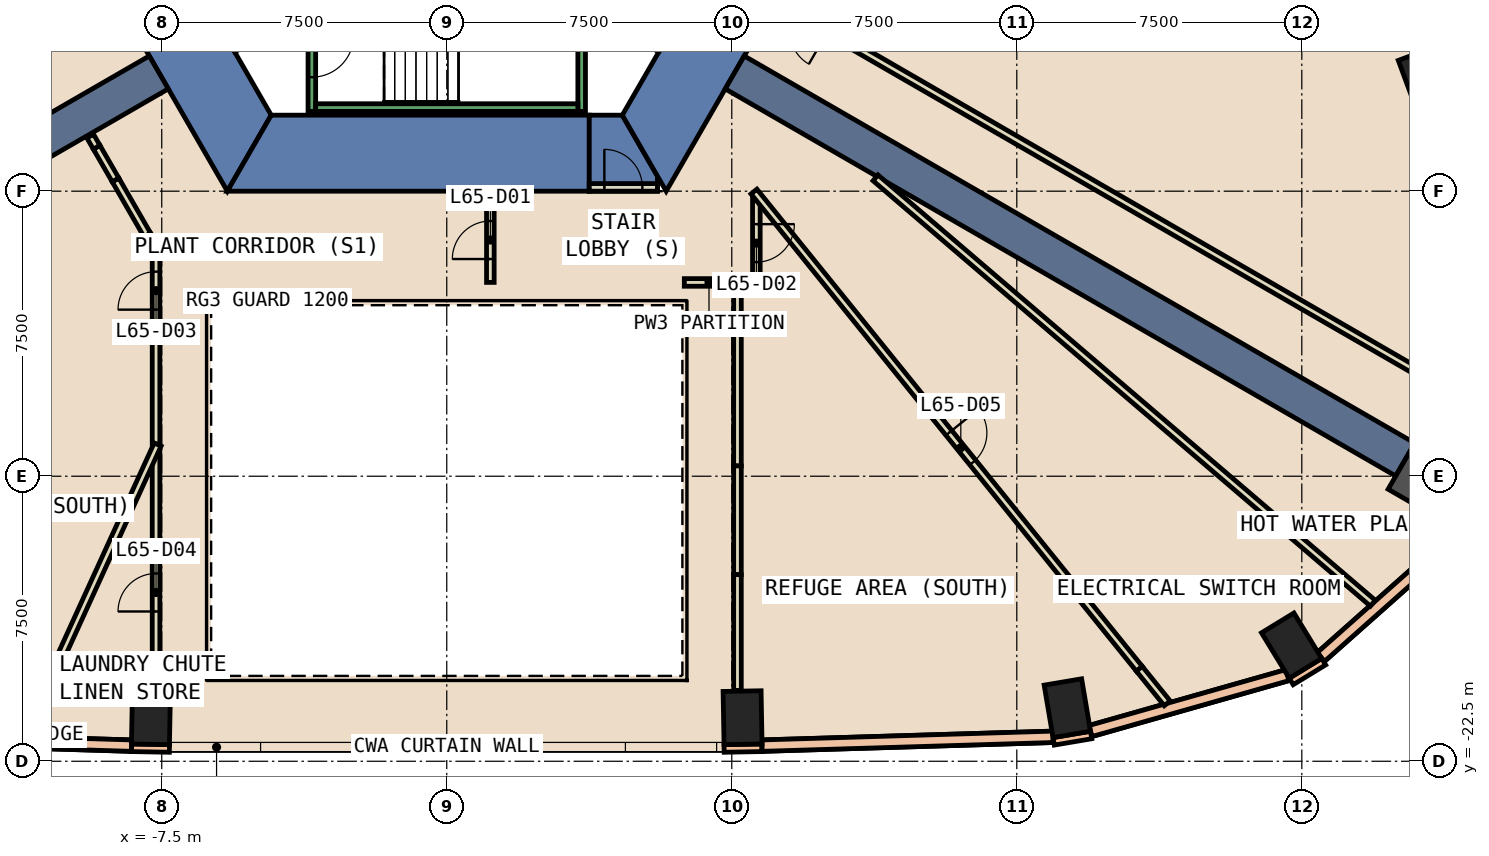
"""IFC4 building model, lengths in metres.
Left out: names, types, materials, properties, quantities, classifications, styles, units other than length and angle.
Written with IfcOpenShell. Run it as: python <this file> out.ifc"""

import sys

from ifc_helpers import new_model, si_unit, direction, frame, frame_2d, origin, origin_2d, place, context, subcontext, project, spatial, polyline, rectangle, outline, extrude, element, fill, save


model = new_model("IFC4")
c1 = context("Model", 3, precision=1e-05, world=origin(), true_north=direction((0.0, 1.0)))
c2 = subcontext(c1, "Body", "Model", "MODEL_VIEW")
j1 = project(units=[si_unit("LENGTHUNIT", "METRE"), si_unit("PLANEANGLEUNIT", "RADIAN")], contexts=[c1])
p1 = place(None, origin())
s1 = spatial("IfcSite", under=j1, at=p1, CompositionType="ELEMENT")
p2 = place(p1, origin())
s2 = spatial("IfcBuilding", under=s1, at=p2, CompositionType="ELEMENT")
p3 = place(p2, frame((0.0, 0.0, 281.0)))
s3 = spatial("IfcBuildingStorey", under=s2, at=p3, CompositionType="ELEMENT", Elevation=281.0)
for number, where, z_axis, x_axis in (
    (1, (-7.784, -21.354, -0.6), (0.0, 0.0, 1.0), (-1.0, 0.018, 0.0)),
    (2, (7.784, -21.354, -0.6), (0.0, 0.0, 1.0), (1.0, 0.018, 0.0)),
    (3, (16.33, -21.104, -0.6), (0.0, 0.0, 1.0), (0.986, 0.167, 0.0)),
    (4, (22.231, -19.457, -0.6), (0.0, 0.0, 1.0), (0.853, 0.521, 0.0)),
):
    element("IfcColumn", number, at=place(p3, frame(where, z_axis=z_axis, x_axis=x_axis)), inside=s3, PredefinedType="COLUMN", context=c2, shape_type="SweptSolid", body=[
        extrude(rectangle(XDim=1.0, YDim=1.4, at=origin_2d()), origin(), (0.0, 0.0, 1.0), 5.4),
    ])
p4 = place(p3, frame((26.001, -15.012, -0.6), z_axis=(0.0, 0.0, 1.0), x_axis=(-0.866025403784, 0.5, 0.0)))
e5 = element("IfcColumn", 5, at=p4, inside=s3, PredefinedType="COLUMN", context=c2, shape_type="SweptSolid", body=[
    extrude(rectangle(XDim=1.8, YDim=1.8, at=origin_2d()), origin(), (0.0, 0.0, 1.0), 5.4),
])
p5 = place(p3, frame((25.869, -4.285, -0.6), z_axis=(0.0, 0.0, 1.0), x_axis=(-0.346853804003, 0.937919206888, 0.0)))
e6 = element("IfcColumn", 6, at=p5, inside=s3, PredefinedType="COLUMN", context=c2, shape_type="SweptSolid", body=[
    extrude(rectangle(XDim=1.0, YDim=1.4, at=origin_2d()), origin(), (0.0, 0.0, 1.0), 5.4),
])
p6 = place(p3, frame((0.0, 0.0, -0.6)))
e7 = element("IfcWall", 7, at=p6, inside=s3, PredefinedType="SHEAR", context=c2, shape_type="SweptSolid", body=[
    extrude(outline(polyline([(-11.547, 2.5), (-5.774, -7.5), (-4.619, -5.5), (-9.238, 2.5), (-11.547, 2.5)])), origin(), (0.0, 0.0, 1.0), 5.4),
])
p7 = place(p3, frame((0.0, 0.0, -0.6)))
e8 = element("IfcWall", 8, at=p7, inside=s3, PredefinedType="SHEAR", context=c2, shape_type="SweptSolid", body=[
    extrude(outline(polyline([(3.75, -7.5), (3.75, -5.5), (-4.619, -5.5), (-5.774, -7.5), (3.75, -7.5)])), origin(), (0.0, 0.0, 1.0), 5.4),
])
p8 = place(p3, frame((0.0, 0.0, 3.6)))
e9 = element("IfcWall", 9, at=p8, inside=s3, PredefinedType="SHEAR", context=c2, shape_type="SweptSolid", body=[
    extrude(outline(polyline([(5.544, -7.5), (5.544, -7.102), (4.619, -5.5), (3.75, -5.5), (3.75, -7.5), (5.544, -7.5)])), origin(), (0.0, 0.0, 1.0), 1.2),
])
p9 = place(p3, frame((0.0, 0.0, -0.6)))
e10 = element("IfcWall", 10, at=p9, inside=s3, PredefinedType="SHEAR", context=c2, shape_type="SweptSolid", body=[
    extrude(outline(polyline([(5.774, -7.5), (11.547, 2.5), (9.238, 2.5), (4.619, -5.5), (5.774, -7.5)])), origin(), (0.0, 0.0, 1.0), 5.4),
])
for number, where, z_axis, x_axis in (
    (11, (7.578, -4.375, 0.0), (0.0, 0.0, 1.0), (0.866, -0.5, 0.0)),
    (12, (-7.578, -4.375, 0.0), (0.0, 0.0, 1.0), (-0.866, -0.5, 0.0)),
):
    element("IfcWall", number, at=place(p3, frame(where, z_axis=z_axis, x_axis=x_axis)), inside=s3, PredefinedType="SHEAR", context=c2, shape_type="SweptSolid", body=[
        extrude(rectangle(XDim=20.374, YDim=1.0, at=frame_2d((10.187, 0.0))), origin(), (0.0, 0.0, 1.0), 4.8),
    ])
for number, where, z_axis, x_axis in (
    (13, (-8.298, -22.145, 0.0), (0.0, 0.0, 1.0), (1.0, -0.018, 0.0)),
    (14, (7.298, -22.163, 0.0), (0.0, 0.0, 1.0), (1.0, 0.018, 0.0)),
    (15, (15.97, -21.976, 0.0), (0.0, 0.0, 1.0), (0.986, 0.167, 0.0)),
):
    element("IfcWall", number, at=place(p3, frame(where, z_axis=z_axis, x_axis=x_axis)), inside=s3, PredefinedType="STANDARD", context=c2, shape_type="SweptSolid", body=[
        extrude(rectangle(XDim=1.0, YDim=0.2, at=frame_2d((0.5, 0.0))), origin(), (0.0, 0.0, 1.0), 4.8),
    ])
p10 = place(p3, frame((22.221, -20.4, 0.0), z_axis=(0.0, 0.0, 1.0), x_axis=(0.853679739553, 0.520798331677, 0.0)))
e16 = element("IfcWall", 16, at=p10, inside=s3, PredefinedType="STANDARD", context=c2, shape_type="SweptSolid", body=[
    extrude(rectangle(XDim=1.0, YDim=0.2, at=frame_2d((0.5, 0.0))), origin(), (0.0, 0.0, 1.0), 4.8),
])
p11 = place(p3, frame((-15.951, -21.857, 0.0), z_axis=(0.0, 0.0, 1.0), x_axis=(0.999540359891, -0.030316149968, 0.0)))
e17 = element("IfcWall", 17, at=p11, inside=s3, PredefinedType="STANDARD", context=c2, shape_type="SweptSolid", body=[
    extrude(rectangle(XDim=7.658, YDim=0.3, at=frame_2d((3.829, 0.0))), origin(), (0.0, 0.0, 1.0), 1.2),
])
p12 = place(p3, frame((-15.951, -21.857, 4.0), z_axis=(0.0, 0.0, 1.0), x_axis=(0.999540359891, -0.030316149968, 0.0)))
e18 = element("IfcWall", 18, at=p12, inside=s3, PredefinedType="STANDARD", context=c2, shape_type="SweptSolid", body=[
    extrude(rectangle(XDim=7.658, YDim=0.3, at=frame_2d((3.829, 0.0))), origin(), (0.0, 0.0, 1.0), 0.8),
])
p13 = place(p3, frame((8.296, -22.089, 0.0), z_axis=(0.0, 0.0, 1.0), x_axis=(0.999540359891, 0.030316149968, 0.0)))
e19 = element("IfcWall", 19, at=p13, inside=s3, PredefinedType="STANDARD", context=c2, shape_type="SweptSolid", body=[
    extrude(rectangle(XDim=7.658, YDim=0.3, at=frame_2d((3.829, 0.0))), origin(), (0.0, 0.0, 1.0), 1.2),
])
p14 = place(p3, frame((8.296, -22.089, 4.0), z_axis=(0.0, 0.0, 1.0), x_axis=(0.999540359891, 0.030316149968, 0.0)))
e20 = element("IfcWall", 20, at=p14, inside=s3, PredefinedType="STANDARD", context=c2, shape_type="SweptSolid", body=[
    extrude(rectangle(XDim=7.658, YDim=0.3, at=frame_2d((3.829, 0.0))), origin(), (0.0, 0.0, 1.0), 0.8),
])
p15 = place(p3, frame((16.938, -21.705, 0.0), z_axis=(0.0, 0.0, 1.0), x_axis=(0.961984350903, 0.27310457451, 0.0)))
e21 = element("IfcWall", 21, at=p15, inside=s3, PredefinedType="STANDARD", context=c2, shape_type="SweptSolid", body=[
    extrude(rectangle(XDim=5.387, YDim=0.3, at=frame_2d((2.693, 0.0))), origin(), (0.0, 0.0, 1.0), 1.2),
])
p16 = place(p3, frame((16.938, -21.705, 4.0), z_axis=(0.0, 0.0, 1.0), x_axis=(0.961984350903, 0.27310457451, 0.0)))
e22 = element("IfcWall", 22, at=p16, inside=s3, PredefinedType="STANDARD", context=c2, shape_type="SweptSolid", body=[
    extrude(rectangle(XDim=5.387, YDim=0.3, at=frame_2d((2.693, 0.0))), origin(), (0.0, 0.0, 1.0), 0.8),
])
p17 = place(p3, frame((23.0, -19.758, 0.0), z_axis=(0.0, 0.0, 1.0), x_axis=(0.747938022937, 0.663768569492, 0.0)))
e23 = element("IfcWall", 23, at=p17, inside=s3, PredefinedType="STANDARD", context=c2, shape_type="SweptSolid", body=[
    extrude(rectangle(XDim=4.966, YDim=0.3, at=frame_2d((2.483, 0.0))), origin(), (0.0, 0.0, 1.0), 1.2),
])
p18 = place(p3, frame((23.0, -19.758, 4.0), z_axis=(0.0, 0.0, 1.0), x_axis=(0.747938022937, 0.663768569492, 0.0)))
e24 = element("IfcWall", 24, at=p18, inside=s3, PredefinedType="STANDARD", context=c2, shape_type="SweptSolid", body=[
    extrude(rectangle(XDim=4.966, YDim=0.3, at=frame_2d((2.483, 0.0))), origin(), (0.0, 0.0, 1.0), 0.8),
])
p19 = place(p3, frame((1.147, -9.9, 0.0), z_axis=(0.0, 0.0, 1.0), x_axis=(0.0, 1.0, 0.0)))
e25 = element("IfcWall", 25, at=p19, inside=s3, PredefinedType="PARTITIONING", context=c2, shape_type="SweptSolid", body=[
    extrude(rectangle(XDim=2.4, YDim=0.2, at=frame_2d((1.2, 0.0))), origin(), (0.0, 0.0, 1.0), 4.8),
])
p20 = place(p19, frame((0.615, 0.0, 0.0)))
e26 = element("IfcOpeningElement", 26, at=p20, cuts=e25, PredefinedType="OPENING", context=c2, shape_type="SweptSolid", body=[
    extrude(rectangle(XDim=1.0, YDim=2.1, at=frame_2d((0.5, 1.05))), frame((0.0, 0.11, 0.0), z_axis=(0.0, -1.0, 0.0), x_axis=(1.0, 0.0, 0.0)), (0.0, 0.0, 1.0), 0.22),
])
p21 = place(p3, frame((6.251, -9.901, 0.0), z_axis=(0.0, 0.0, 1.0), x_axis=(1.0, 0.0, 0.0)))
e27 = element("IfcWall", 27, at=p21, inside=s3, PredefinedType="PARTITIONING", context=c2, shape_type="SweptSolid", body=[
    extrude(rectangle(XDim=1.299, YDim=0.2, at=frame_2d((0.649, 0.0))), origin(), (0.0, 0.0, 1.0), 2.4),
])
p22 = place(p3, frame((8.147, -7.688, 0.0), z_axis=(0.0, 0.0, 1.0), x_axis=(0.0, -1.0, 0.0)))
e28 = element("IfcWall", 28, at=p22, inside=s3, PredefinedType="PARTITIONING", context=c2, shape_type="SweptSolid", body=[
    extrude(rectangle(XDim=2.312, YDim=0.2, at=frame_2d((1.156, 0.0))), origin(), (0.0, 0.0, 1.0), 4.8),
])
p23 = place(p22, frame((0.679, 0.0, 0.0)))
e29 = element("IfcOpeningElement", 29, at=p23, cuts=e28, PredefinedType="OPENING", context=c2, shape_type="SweptSolid", body=[
    extrude(rectangle(XDim=1.0, YDim=2.1, at=frame_2d((0.5, 1.05))), frame((0.0, 0.11, 0.0), z_axis=(0.0, -1.0, 0.0), x_axis=(1.0, 0.0, 0.0)), (0.0, 0.0, 1.0), 0.22),
])
p24 = place(p3, frame((7.65, -9.801, 0.0), z_axis=(0.0, 0.0, 1.0), x_axis=(0.0, -1.0, 0.0)))
e30 = element("IfcWall", 30, at=p24, inside=s3, PredefinedType="PARTITIONING", context=c2, shape_type="SweptSolid", body=[
    extrude(rectangle(XDim=0.377, YDim=0.2, at=frame_2d((0.188, 0.0))), origin(), (0.0, 0.0, 1.0), 2.4),
])
p25 = place(p3, frame((-7.65, -14.157, 0.0), z_axis=(0.0, 0.0, 1.0), x_axis=(0.0, 1.0, 0.0)))
e31 = element("IfcWall", 31, at=p25, inside=s3, PredefinedType="PARTITIONING", context=c2, shape_type="SweptSolid", body=[
    extrude(rectangle(XDim=5.206, YDim=0.2, at=frame_2d((2.603, 0.0))), origin(), (0.0, 0.0, 1.0), 4.8),
])
p26 = place(p25, frame((3.54, 0.0, 0.0)))
e32 = element("IfcOpeningElement", 32, at=p26, cuts=e31, PredefinedType="OPENING", context=c2, shape_type="SweptSolid", body=[
    extrude(rectangle(XDim=1.0, YDim=2.1, at=frame_2d((0.5, 1.05))), frame((0.0, 0.11, 0.0), z_axis=(0.0, -1.0, 0.0), x_axis=(1.0, 0.0, 0.0)), (0.0, 0.0, 1.0), 0.22),
])
p27 = place(p3, frame((-7.7, -8.965, 0.0), z_axis=(0.0, 0.0, 1.0), x_axis=(-0.49946991135, 0.866331234376, 0.0)))
e33 = element("IfcWall", 33, at=p27, inside=s3, PredefinedType="PARTITIONING", context=c2, shape_type="SweptSolid", body=[
    extrude(rectangle(XDim=0.363, YDim=0.2, at=frame_2d((0.181, 0.0))), origin(), (0.0, 0.0, 1.0), 2.4),
])
p28 = place(p3, frame((-7.65, -20.636, 0.0), z_axis=(0.0, 0.0, 1.0), x_axis=(0.0, 1.0, 0.0)))
e34 = element("IfcWall", 34, at=p28, inside=s3, PredefinedType="PARTITIONING", context=c2, shape_type="SweptSolid", body=[
    extrude(rectangle(XDim=6.279, YDim=0.2, at=frame_2d((3.14, 0.0))), origin(), (0.0, 0.0, 1.0), 4.8),
])
p29 = place(p28, frame((2.077, 0.0, 0.0)))
e35 = element("IfcOpeningElement", 35, at=p29, cuts=e34, PredefinedType="OPENING", context=c2, shape_type="SweptSolid", body=[
    extrude(rectangle(XDim=1.0, YDim=2.1, at=frame_2d((0.5, 1.05))), frame((0.0, 0.11, 0.0), z_axis=(0.0, -1.0, 0.0), x_axis=(1.0, 0.0, 0.0)), (0.0, 0.0, 1.0), 0.22),
])
p30 = place(p3, frame((8.084, -7.51, 0.0), z_axis=(0.0, 0.0, 1.0), x_axis=(0.628300137945, -0.777971038445, 0.0)))
e36 = element("IfcWall", 36, at=p30, inside=s3, PredefinedType="PARTITIONING", context=c2, shape_type="SweptSolid", body=[
    extrude(rectangle(XDim=16.141, YDim=0.2, at=frame_2d((8.07, 0.0))), origin(), (0.0, 0.0, 1.0), 4.8),
])
p31 = place(p30, frame((8.163, 0.0, 0.0)))
e37 = element("IfcOpeningElement", 37, at=p31, cuts=e36, PredefinedType="OPENING", context=c2, shape_type="SweptSolid", body=[
    extrude(rectangle(XDim=1.0, YDim=2.1, at=frame_2d((0.5, 1.05))), frame((0.0, 0.11, 0.0), z_axis=(0.0, -1.0, 0.0), x_axis=(1.0, 0.0, 0.0)), (0.0, 0.0, 1.0), 0.22),
])
p32 = place(p3, frame((-7.608, -14.166, 0.0), z_axis=(0.0, 0.0, 1.0), x_axis=(-0.415367833022, -0.909653540251, 0.0)))
e38 = element("IfcWall", 38, at=p32, inside=s3, PredefinedType="PARTITIONING", context=c2, shape_type="SweptSolid", body=[
    extrude(rectangle(XDim=7.273, YDim=0.2, at=frame_2d((3.636, 0.0))), origin(), (0.0, 0.0, 1.0), 4.8),
])
p33 = place(p3, frame((11.282, -7.149, 0.0), z_axis=(0.0, 0.0, 1.0), x_axis=(0.759981627741, -0.64994455571, 0.0)))
e39 = element("IfcWall", 39, at=p33, inside=s3, PredefinedType="PARTITIONING", context=c2, shape_type="SweptSolid", body=[
    extrude(rectangle(XDim=17.222, YDim=0.2, at=frame_2d((8.611, 0.0))), origin(), (0.0, 0.0, 1.0), 4.8),
])
p34 = place(p3, frame((10.652, -3.65, 0.0), z_axis=(0.0, 0.0, 1.0), x_axis=(0.86603131093, -0.499989768384, 0.0)))
e40 = element("IfcWall", 40, at=p34, inside=s3, PredefinedType="PARTITIONING", context=c2, shape_type="SweptSolid", body=[
    extrude(rectangle(XDim=18.104, YDim=0.2, at=frame_2d((9.052, 0.0))), origin(), (0.0, 0.0, 1.0), 4.8),
])
p35 = place(p3, frame((3.75, -7.4, 0.0), z_axis=(0.0, 0.0, 1.0), x_axis=(1.0, 0.0, 0.0)))
e41 = element("IfcWall", 41, at=p35, inside=s3, PredefinedType="PARTITIONING", context=c2, shape_type="SweptSolid", body=[
    extrude(rectangle(XDim=1.794, YDim=0.2, at=frame_2d((0.897, 0.0))), origin(), (0.0, 0.0, 1.0), 2.4),
])
p36 = place(p35, frame((0.397, 0.0, 0.0)))
e42 = element("IfcOpeningElement", 42, at=p36, cuts=e41, PredefinedType="OPENING", context=c2, shape_type="SweptSolid", body=[
    extrude(rectangle(XDim=1.0, YDim=2.1, at=frame_2d((0.5, 1.05))), frame((0.0, 0.11, 0.0), z_axis=(0.0, -1.0, 0.0), x_axis=(1.0, 0.0, 0.0)), (0.0, 0.0, 1.0), 0.22),
])
p37 = place(p3, frame((7.65, -10.178, 0.0), z_axis=(0.0, 0.0, 1.0), x_axis=(0.0, -1.0, 0.0)))
e43 = element("IfcWall", 43, at=p37, inside=s3, PredefinedType="PARTITIONING", context=c2, shape_type="SweptSolid", body=[
    extrude(rectangle(XDim=4.551, YDim=0.2, at=frame_2d((2.275, 0.0))), origin(), (0.0, 0.0, 1.0), 4.8),
])
p38 = place(p3, frame((7.65, -14.729, 0.0), z_axis=(0.0, 0.0, 1.0), x_axis=(0.0, -1.0, 0.0)))
e44 = element("IfcWall", 44, at=p38, inside=s3, PredefinedType="PARTITIONING", context=c2, shape_type="SweptSolid", body=[
    extrude(rectangle(XDim=2.861, YDim=0.2, at=frame_2d((1.431, 0.0))), origin(), (0.0, 0.0, 1.0), 2.4),
])
p39 = place(p3, frame((7.65, -17.59, 0.0), z_axis=(0.0, 0.0, 1.0), x_axis=(0.0, -1.0, 0.0)))
e45 = element("IfcWall", 45, at=p39, inside=s3, PredefinedType="PARTITIONING", context=c2, shape_type="SweptSolid", body=[
    extrude(rectangle(XDim=3.046, YDim=0.2, at=frame_2d((1.523, 0.0))), origin(), (0.0, 0.0, 1.0), 4.8),
])
p40 = place(p3, frame((-7.881, -8.651, 0.0), z_axis=(0.0, 0.0, 1.0), x_axis=(-0.499848974954, 0.866112580579, 0.0)))
e46 = element("IfcWall", 46, at=p40, inside=s3, PredefinedType="PARTITIONING", context=c2, shape_type="SweptSolid", body=[
    extrude(rectangle(XDim=1.67, YDim=0.2, at=frame_2d((0.835, 0.0))), origin(), (0.0, 0.0, 1.0), 4.8),
])
p41 = place(p3, frame((-8.716, -7.204, 0.0), z_axis=(0.0, 0.0, 1.0), x_axis=(-0.500183410155, 0.865919485983, 0.0)))
e47 = element("IfcWall", 47, at=p41, inside=s3, PredefinedType="PARTITIONING", context=c2, shape_type="SweptSolid", body=[
    extrude(rectangle(XDim=0.993, YDim=0.2, at=frame_2d((0.497, 0.0))), origin(), (0.0, 0.0, 1.0), 2.4),
])
p42 = place(p3, frame((-9.213, -6.344, 0.0), z_axis=(0.0, 0.0, 1.0), x_axis=(-0.500097243556, 0.865969252911, 0.0)))
e48 = element("IfcWall", 48, at=p42, inside=s3, PredefinedType="PARTITIONING", context=c2, shape_type="SweptSolid", body=[
    extrude(rectangle(XDim=0.338, YDim=0.2, at=frame_2d((0.169, 0.0))), origin(), (0.0, 0.0, 1.0), 4.8),
])
p43 = place(p3, frame((18.225, -20.067, 0.0), z_axis=(0.0, 0.0, 1.0), x_axis=(0.628103623496, -0.778129705223, 0.0)))
e49 = element("IfcWall", 49, at=p43, inside=s3, PredefinedType="PARTITIONING", context=c2, shape_type="SweptSolid", body=[
    extrude(rectangle(XDim=1.168, YDim=0.2, at=frame_2d((0.584, 0.0))), origin(), (0.0, 0.0, 1.0), 2.4),
])
p44 = place(p3, frame((-3.55, -1.0, 0.0), z_axis=(0.0, 0.0, 1.0), x_axis=(0.0, -1.0, 0.0)))
e50 = element("IfcWall", 50, at=p44, inside=s3, PredefinedType="STANDARD", context=c2, shape_type="SweptSolid", body=[
    extrude(rectangle(XDim=4.4, YDim=0.2, at=frame_2d((2.2, 0.0))), origin(), (0.0, 0.0, 1.0), 4.8),
])
p45 = place(p44, frame((2.4, 0.0, 0.0)))
e51 = element("IfcOpeningElement", 51, at=p45, cuts=e50, PredefinedType="OPENING", context=c2, shape_type="SweptSolid", body=[
    extrude(rectangle(XDim=1.1, YDim=2.2, at=frame_2d((0.55, 1.1))), frame((0.0, 0.11, 0.0), z_axis=(0.0, -1.0, 0.0), x_axis=(1.0, 0.0, 0.0)), (0.0, 0.0, 1.0), 0.22),
])
p46 = place(p3, frame((3.55, -2.667, 0.0), z_axis=(0.0, 0.0, 1.0), x_axis=(0.0, -1.0, 0.0)))
e52 = element("IfcWall", 52, at=p46, inside=s3, PredefinedType="STANDARD", context=c2, shape_type="SweptSolid", body=[
    extrude(rectangle(XDim=2.733, YDim=0.2, at=frame_2d((1.366, 0.0))), origin(), (0.0, 0.0, 1.0), 4.8),
])
p47 = place(p3, frame((-3.45, -5.3, 0.0), z_axis=(0.0, 0.0, 1.0), x_axis=(1.0, 0.0, 0.0)))
e53 = element("IfcWall", 53, at=p47, inside=s3, PredefinedType="STANDARD", context=c2, shape_type="SweptSolid", body=[
    extrude(rectangle(XDim=6.9, YDim=0.2, at=frame_2d((3.45, 0.0))), origin(), (0.0, 0.0, 1.0), 4.8),
])
p48 = place(p20, origin())
e54 = element("IfcDoor", 54, at=p48, inside=s3, OperationType="SINGLE_SWING_RIGHT", PredefinedType="DOOR", context=c2, shape_type="SweptSolid", body=[
    extrude(rectangle(XDim=1.0, YDim=2.1, at=frame_2d((0.5, 1.05))), frame((0.0, 0.025, 0.0), z_axis=(0.0, -1.0, 0.0), x_axis=(1.0, 0.0, 0.0)), (0.0, 0.0, 1.0), 0.05),
])
fill(e26, e54)
p49 = place(p23, origin())
e55 = element("IfcDoor", 55, at=p49, inside=s3, OperationType="SINGLE_SWING_LEFT", PredefinedType="DOOR", context=c2, shape_type="SweptSolid", body=[
    extrude(rectangle(XDim=1.0, YDim=2.1, at=frame_2d((0.5, 1.05))), frame((0.0, 0.025, 0.0), z_axis=(0.0, -1.0, 0.0), x_axis=(1.0, 0.0, 0.0)), (0.0, 0.0, 1.0), 0.05),
])
fill(e29, e55)
p50 = place(p26, origin())
e56 = element("IfcDoor", 56, at=p50, inside=s3, OperationType="SINGLE_SWING_RIGHT", PredefinedType="DOOR", context=c2, shape_type="SweptSolid", body=[
    extrude(rectangle(XDim=1.0, YDim=2.1, at=frame_2d((0.5, 1.05))), frame((0.0, 0.025, 0.0), z_axis=(0.0, -1.0, 0.0), x_axis=(1.0, 0.0, 0.0)), (0.0, 0.0, 1.0), 0.05),
])
fill(e32, e56)
p51 = place(p29, origin())
e57 = element("IfcDoor", 57, at=p51, inside=s3, OperationType="SINGLE_SWING_LEFT", PredefinedType="DOOR", context=c2, shape_type="SweptSolid", body=[
    extrude(rectangle(XDim=1.0, YDim=2.1, at=frame_2d((0.5, 1.05))), frame((0.0, 0.025, 0.0), z_axis=(0.0, -1.0, 0.0), x_axis=(1.0, 0.0, 0.0)), (0.0, 0.0, 1.0), 0.05),
])
fill(e35, e57)
p52 = place(p31, origin())
e58 = element("IfcDoor", 58, at=p52, inside=s3, OperationType="SINGLE_SWING_RIGHT", PredefinedType="DOOR", context=c2, shape_type="SweptSolid", body=[
    extrude(rectangle(XDim=1.0, YDim=2.1, at=frame_2d((0.5, 1.05))), frame((0.0, 0.025, 0.0), z_axis=(0.0, -1.0, 0.0), x_axis=(1.0, 0.0, 0.0)), (0.0, 0.0, 1.0), 0.05),
])
fill(e37, e58)
p53 = place(p36, origin())
e59 = element("IfcDoor", 59, at=p53, inside=s3, OperationType="SINGLE_SWING_LEFT", PredefinedType="DOOR", context=c2, shape_type="SweptSolid", body=[
    extrude(rectangle(XDim=1.0, YDim=2.1, at=frame_2d((0.5, 1.05))), frame((0.0, 0.025, 0.0), z_axis=(0.0, -1.0, 0.0), x_axis=(1.0, 0.0, 0.0)), (0.0, 0.0, 1.0), 0.05),
])
fill(e42, e59)
p54 = place(p45, origin())
e60 = element("IfcDoor", 60, at=p54, inside=s3, OperationType="SINGLE_SWING_LEFT", PredefinedType="DOOR", context=c2, shape_type="SweptSolid", body=[
    extrude(rectangle(XDim=1.1, YDim=2.2, at=frame_2d((0.55, 1.1))), frame((0.0, 0.025, 0.0), z_axis=(0.0, -1.0, 0.0), x_axis=(1.0, 0.0, 0.0)), (0.0, 0.0, 1.0), 0.05),
])
fill(e51, e60)
save(model, sys.argv[1])
